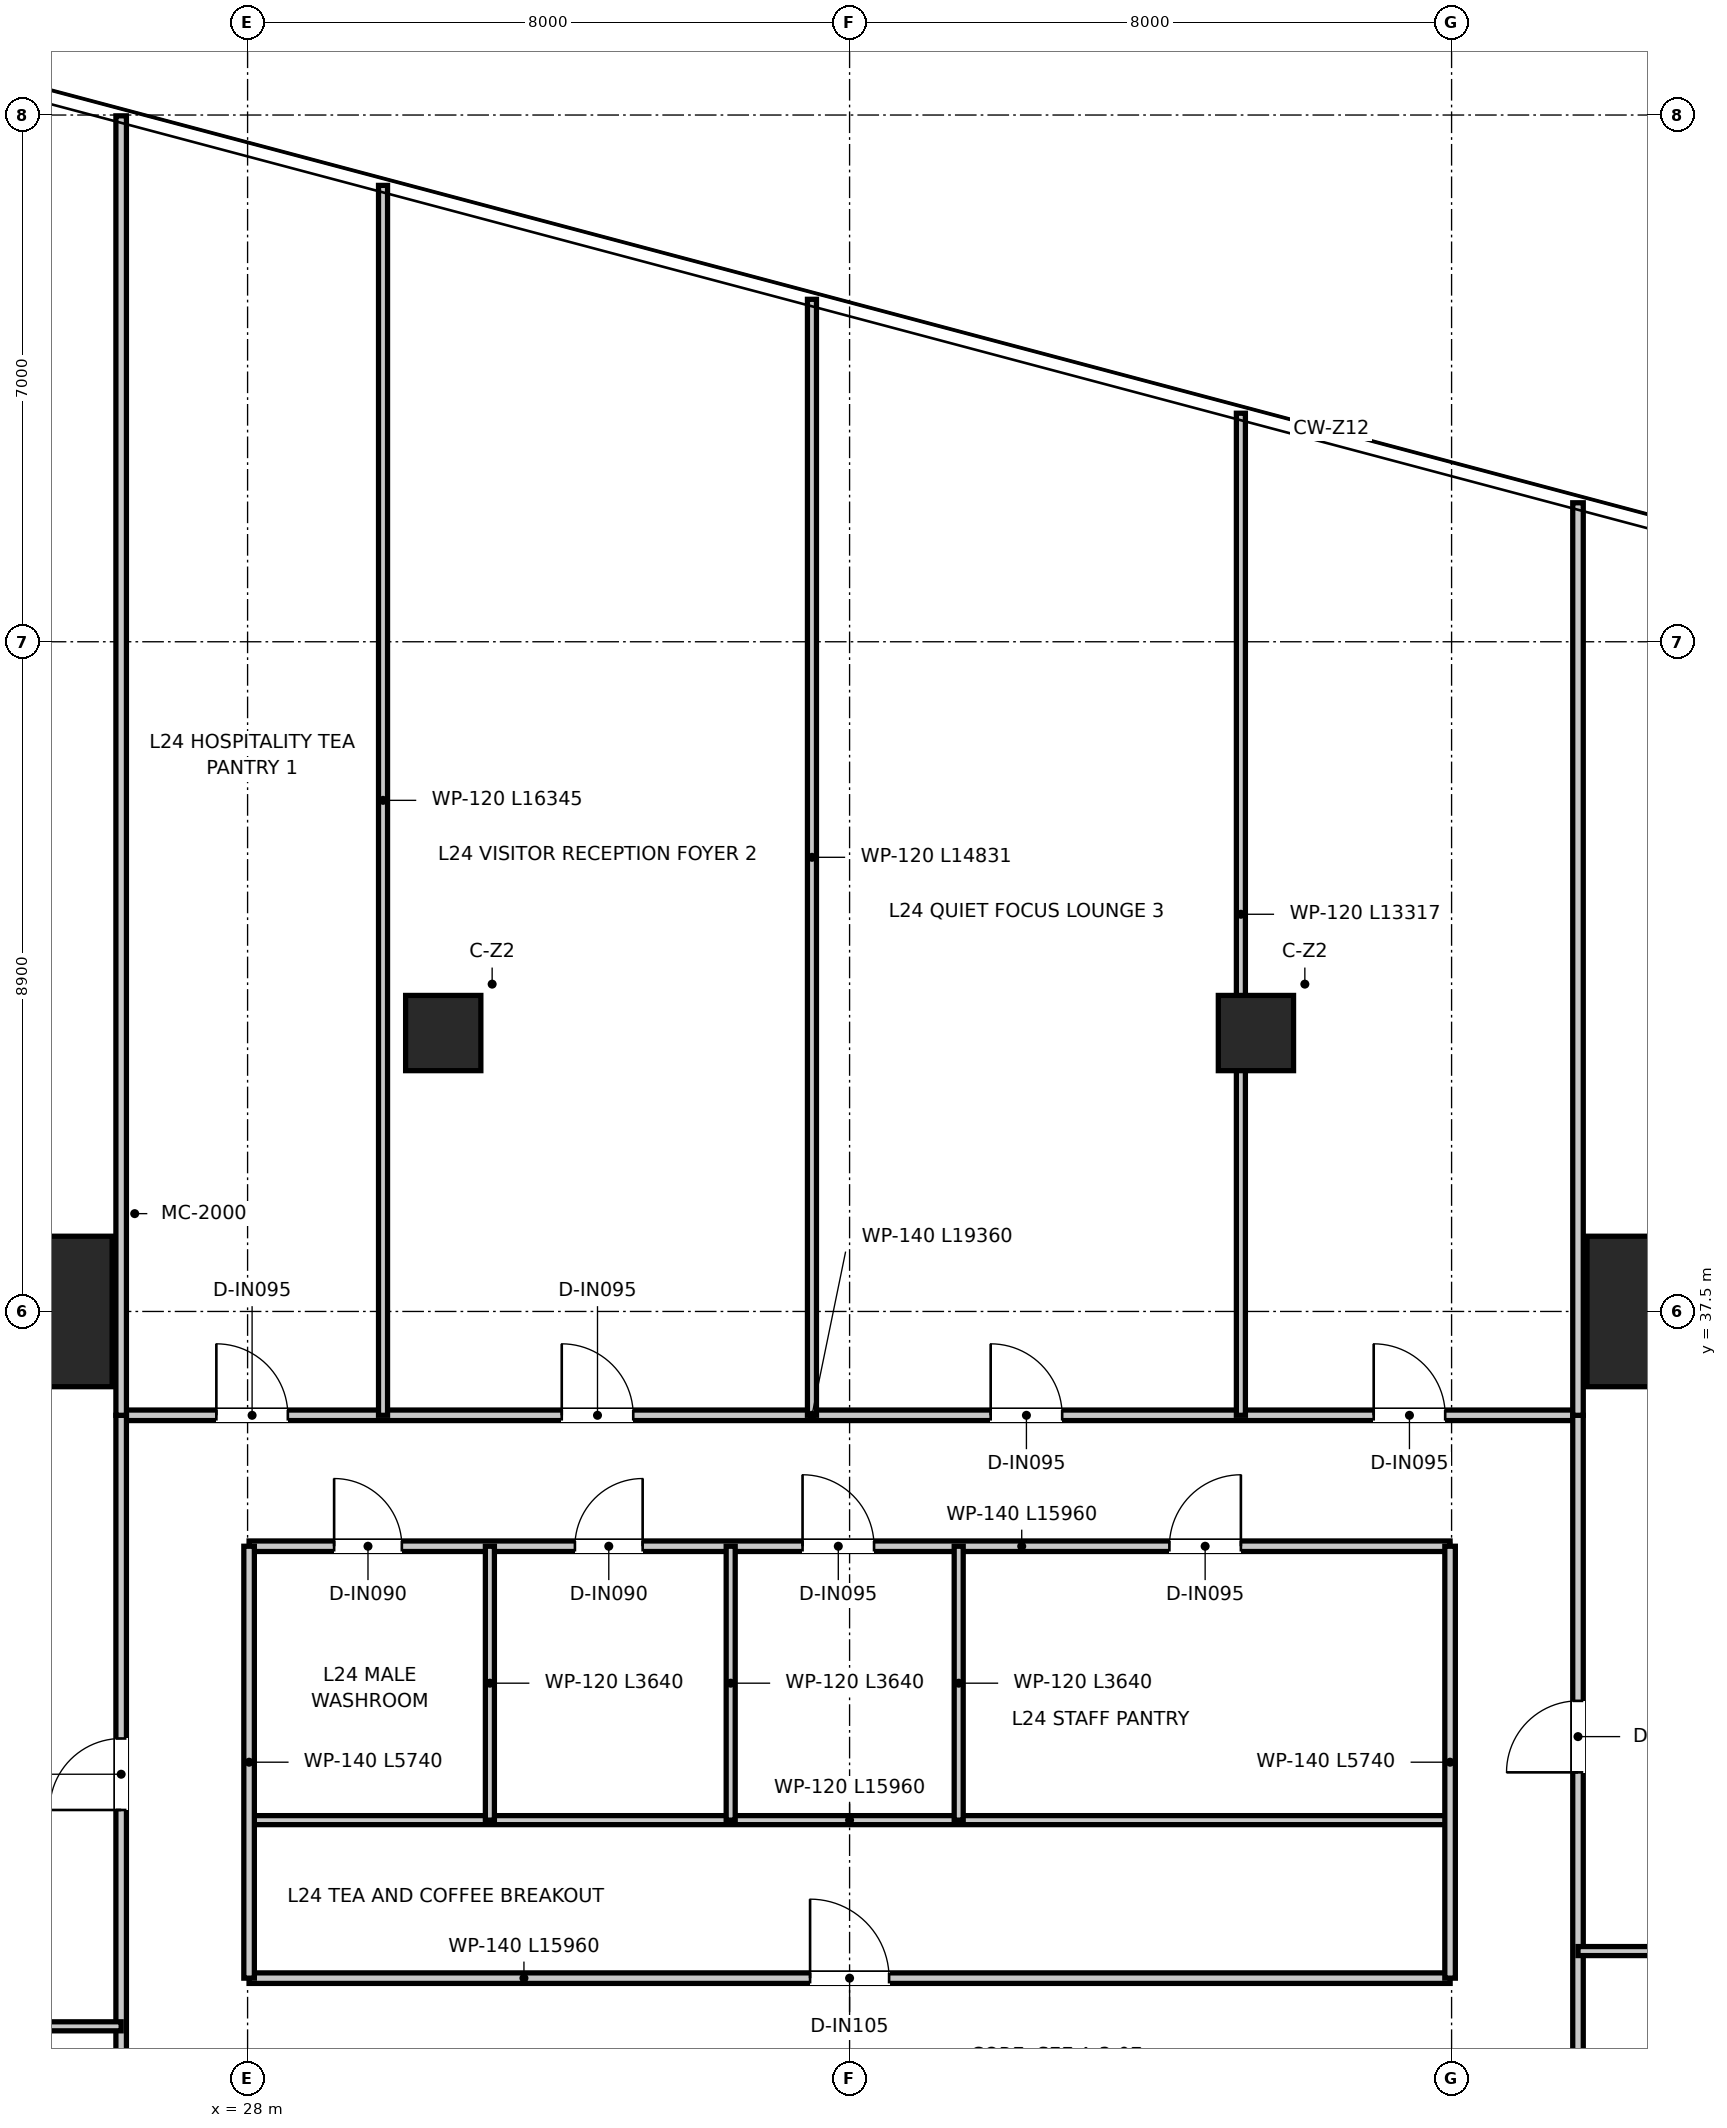
"""IFC4 building model, lengths in metres.
Left out: names, types, materials, properties, quantities, classifications, styles, units other than length and angle.
Written with IfcOpenShell. Run it as: python <this file> out.ifc"""

import sys

from ifc_helpers import new_model, si_unit, direction, frame, frame_2d, origin, origin_2d, place, context, subcontext, project, spatial, rectangle, extrude, source, transform, mapped, element, fill, save


model = new_model("IFC4")
c1 = context("Model", 3, precision=1e-05, world=origin(), true_north=direction((0.0, 1.0)))
c2 = subcontext(c1, "Body", "Model", "MODEL_VIEW")
j1 = project(units=[si_unit("LENGTHUNIT", "METRE"), si_unit("PLANEANGLEUNIT", "RADIAN")], contexts=[c1])
p1 = place(None, origin())
s1 = spatial("IfcSite", under=j1, at=p1, CompositionType="ELEMENT")
p2 = place(p1, origin())
s2 = spatial("IfcBuilding", under=s1, at=p2, CompositionType="ELEMENT")
p3 = place(p2, frame((0.0, 0.0, 101.9)))
s3 = spatial("IfcBuildingStorey", under=s2, at=p3, CompositionType="ELEMENT", Elevation=101.9)
m1 = source(origin(), c2, "Body", "SweptSolid", [
    extrude(rectangle(XDim=2.0, YDim=2.0, at=origin_2d()), origin(), (0.0, 0.0, 1.0), 3.95),
])
for number, where, z_axis, x_axis in (
    (1, (46.8, 37.5, 0.0), (0.0, 0.0, 1.0), (1.0, 0.0, 0.0)),
    (2, (25.2, 37.5, 0.0), (0.0, 0.0, 1.0), (1.0, 0.0, 0.0)),
):
    element("IfcColumn", number, at=place(p3, frame(where, z_axis=z_axis, x_axis=x_axis)), inside=s3, PredefinedType="USERDEFINED", context=c2, shape_type="MappedRepresentation", body=[
        mapped(m1, transform((0.0, 0.0, 0.0), x_axis=(1.0, 0.0, 0.0), y_axis=(0.0, 1.0, 0.0), z_axis=(0.0, 0.0, 1.0), scale=1.0)),
    ])
m2 = source(origin(), c2, "Body", "SweptSolid", [
    extrude(rectangle(XDim=1.0, YDim=1.0, at=origin_2d()), origin(), (0.0, 0.0, 1.0), 3.95),
])
for number, where, z_axis, x_axis in (
    (3, (30.6, 41.2, 0.0), (0.0, 0.0, 1.0), (1.0, 0.0, 0.0)),
    (4, (41.4, 41.2, 0.0), (0.0, 0.0, 1.0), (1.0, 0.0, 0.0)),
):
    element("IfcColumn", number, at=place(p3, frame(where, z_axis=z_axis, x_axis=x_axis)), inside=s3, PredefinedType="COLUMN", context=c2, shape_type="MappedRepresentation", body=[
        mapped(m2, transform((0.0, 0.0, 0.0), x_axis=(1.0, 0.0, 0.0), y_axis=(0.0, 1.0, 0.0), z_axis=(0.0, 0.0, 1.0), scale=1.0)),
    ])
p4 = place(p3, frame((28.02, 28.64, 0.0), z_axis=(0.0, 0.0, 1.0), x_axis=(1.0, 0.0, 0.0)))
e5 = element("IfcWall", 5, at=p4, inside=s3, PredefinedType="PARTITIONING", context=c2, shape_type="SweptSolid", body=[
    extrude(rectangle(XDim=15.96, YDim=0.14, at=frame_2d((7.98, 0.0))), origin(), (0.0, 0.0, 1.0), 3.08),
])
p5 = place(p4, frame((7.455, 0.0, 0.0)))
e6 = element("IfcOpeningElement", 6, at=p5, cuts=e5, PredefinedType="OPENING", context=c2, shape_type="SweptSolid", body=[
    extrude(rectangle(XDim=1.05, YDim=2.15, at=frame_2d((0.525, 1.075))), frame((0.0, 0.08, 0.0), z_axis=(0.0, -1.0, 0.0), x_axis=(1.0, 0.0, 0.0)), (0.0, 0.0, 1.0), 0.16),
])
p6 = place(p3, frame((28.02, 30.74, 0.0), z_axis=(0.0, 0.0, 1.0), x_axis=(1.0, 0.0, 0.0)))
e7 = element("IfcWall", 7, at=p6, inside=s3, PredefinedType="PARTITIONING", context=c2, shape_type="SweptSolid", body=[
    extrude(rectangle(XDim=15.96, YDim=0.12, at=frame_2d((7.98, 0.0))), origin(), (0.0, 0.0, 1.0), 3.08),
])
p7 = place(p3, frame((28.02, 34.38, 0.0), z_axis=(0.0, 0.0, 1.0), x_axis=(1.0, 0.0, 0.0)))
e8 = element("IfcWall", 8, at=p7, inside=s3, PredefinedType="PARTITIONING", context=c2, shape_type="SweptSolid", body=[
    extrude(rectangle(XDim=15.96, YDim=0.14, at=frame_2d((7.98, 0.0))), origin(), (0.0, 0.0, 1.0), 3.08),
])
p8 = place(p7, frame((1.13, 0.0, 0.0)))
e9 = element("IfcOpeningElement", 9, at=p8, cuts=e8, PredefinedType="OPENING", context=c2, shape_type="SweptSolid", body=[
    extrude(rectangle(XDim=0.9, YDim=2.1, at=frame_2d((0.45, 1.05))), frame((0.0, 0.08, 0.0), z_axis=(0.0, -1.0, 0.0), x_axis=(1.0, 0.0, 0.0)), (0.0, 0.0, 1.0), 0.16),
])
p9 = place(p7, frame((4.33, 0.0, 0.0)))
e10 = element("IfcOpeningElement", 10, at=p9, cuts=e8, PredefinedType="OPENING", context=c2, shape_type="SweptSolid", body=[
    extrude(rectangle(XDim=0.9, YDim=2.1, at=frame_2d((0.45, 1.05))), frame((0.0, 0.08, 0.0), z_axis=(0.0, -1.0, 0.0), x_axis=(1.0, 0.0, 0.0)), (0.0, 0.0, 1.0), 0.16),
])
p10 = place(p7, frame((7.355, 0.0, 0.0)))
e11 = element("IfcOpeningElement", 11, at=p10, cuts=e8, PredefinedType="OPENING", context=c2, shape_type="SweptSolid", body=[
    extrude(rectangle(XDim=0.95, YDim=2.1, at=frame_2d((0.475, 1.05))), frame((0.0, 0.08, 0.0), z_axis=(0.0, -1.0, 0.0), x_axis=(1.0, 0.0, 0.0)), (0.0, 0.0, 1.0), 0.16),
])
p11 = place(p7, frame((12.23, 0.0, 0.0)))
e12 = element("IfcOpeningElement", 12, at=p11, cuts=e8, PredefinedType="OPENING", context=c2, shape_type="SweptSolid", body=[
    extrude(rectangle(XDim=0.95, YDim=2.1, at=frame_2d((0.475, 1.05))), frame((0.0, 0.08, 0.0), z_axis=(0.0, -1.0, 0.0), x_axis=(1.0, 0.0, 0.0)), (0.0, 0.0, 1.0), 0.16),
])
for number, where, z_axis, x_axis in (
    (13, (28.02, 28.64, 0.0), (0.0, 0.0, 1.0), (0.0, 1.0, 0.0)),
    (14, (43.98, 28.64, 0.0), (0.0, 0.0, 1.0), (0.0, 1.0, 0.0)),
):
    element("IfcWall", number, at=place(p3, frame(where, z_axis=z_axis, x_axis=x_axis)), inside=s3, PredefinedType="PARTITIONING", context=c2, shape_type="SweptSolid", body=[
        extrude(rectangle(XDim=5.74, YDim=0.14, at=frame_2d((2.87, 0.0))), origin(), (0.0, 0.0, 1.0), 3.27),
    ])
for number, where, z_axis, x_axis in (
    (15, (31.22, 30.74, 0.0), (0.0, 0.0, 1.0), (0.0, 1.0, 0.0)),
    (16, (34.42, 30.74, 0.0), (0.0, 0.0, 1.0), (0.0, 1.0, 0.0)),
    (17, (37.45, 30.74, 0.0), (0.0, 0.0, 1.0), (0.0, 1.0, 0.0)),
):
    element("IfcWall", number, at=place(p3, frame(where, z_axis=z_axis, x_axis=x_axis)), inside=s3, PredefinedType="PARTITIONING", context=c2, shape_type="SweptSolid", body=[
        extrude(rectangle(XDim=3.64, YDim=0.12, at=frame_2d((1.82, 0.0))), origin(), (0.0, 0.0, 1.0), 3.17),
    ])
p12 = place(p3, frame((26.32, 36.12, 0.0), z_axis=(0.0, 0.0, 1.0), x_axis=(1.0, 0.0, 0.0)))
e18 = element("IfcWall", 18, at=p12, inside=s3, PredefinedType="PARTITIONING", context=c2, shape_type="SweptSolid", body=[
    extrude(rectangle(XDim=19.36, YDim=0.14, at=frame_2d((9.68, 0.0))), origin(), (0.0, 0.0, 1.0), 3.08),
])
p13 = place(p12, frame((1.265, 0.0, 0.0)))
e19 = element("IfcOpeningElement", 19, at=p13, cuts=e18, PredefinedType="OPENING", context=c2, shape_type="SweptSolid", body=[
    extrude(rectangle(XDim=0.95, YDim=2.1, at=frame_2d((0.475, 1.05))), frame((0.0, 0.08, 0.0), z_axis=(0.0, -1.0, 0.0), x_axis=(1.0, 0.0, 0.0)), (0.0, 0.0, 1.0), 0.16),
])
p14 = place(p12, frame((5.855, 0.0, 0.0)))
e20 = element("IfcOpeningElement", 20, at=p14, cuts=e18, PredefinedType="OPENING", context=c2, shape_type="SweptSolid", body=[
    extrude(rectangle(XDim=0.95, YDim=2.1, at=frame_2d((0.475, 1.05))), frame((0.0, 0.08, 0.0), z_axis=(0.0, -1.0, 0.0), x_axis=(1.0, 0.0, 0.0)), (0.0, 0.0, 1.0), 0.16),
])
p15 = place(p12, frame((11.555, 0.0, 0.0)))
e21 = element("IfcOpeningElement", 21, at=p15, cuts=e18, PredefinedType="OPENING", context=c2, shape_type="SweptSolid", body=[
    extrude(rectangle(XDim=0.95, YDim=2.1, at=frame_2d((0.475, 1.05))), frame((0.0, 0.08, 0.0), z_axis=(0.0, -1.0, 0.0), x_axis=(1.0, 0.0, 0.0)), (0.0, 0.0, 1.0), 0.16),
])
p16 = place(p12, frame((16.645, 0.0, 0.0)))
e22 = element("IfcOpeningElement", 22, at=p16, cuts=e18, PredefinedType="OPENING", context=c2, shape_type="SweptSolid", body=[
    extrude(rectangle(XDim=0.95, YDim=2.1, at=frame_2d((0.475, 1.05))), frame((0.0, 0.08, 0.0), z_axis=(0.0, -1.0, 0.0), x_axis=(1.0, 0.0, 0.0)), (0.0, 0.0, 1.0), 0.16),
])
p17 = place(p3, frame((26.32, 10.5, 0.0), z_axis=(0.0, 0.0, 1.0), x_axis=(0.0, 1.0, 0.0)))
e23 = element("IfcWall", 23, at=p17, inside=s3, PredefinedType="PARTITIONING", context=c2, shape_type="SweptSolid", body=[
    extrude(rectangle(XDim=25.62, YDim=0.14, at=frame_2d((12.81, 0.0))), origin(), (0.0, 0.0, 1.0), 2.97),
])
p18 = place(p17, frame((11.775, 0.0, 0.0)))
e24 = element("IfcOpeningElement", 24, at=p18, cuts=e23, PredefinedType="OPENING", context=c2, shape_type="SweptSolid", body=[
    extrude(rectangle(XDim=0.95, YDim=2.1, at=frame_2d((0.475, 1.05))), frame((0.0, 0.08, 0.0), z_axis=(0.0, -1.0, 0.0), x_axis=(1.0, 0.0, 0.0)), (0.0, 0.0, 1.0), 0.16),
])
p19 = place(p17, frame((20.375, 0.0, 0.0)))
e25 = element("IfcOpeningElement", 25, at=p19, cuts=e23, PredefinedType="OPENING", context=c2, shape_type="SweptSolid", body=[
    extrude(rectangle(XDim=0.95, YDim=2.1, at=frame_2d((0.475, 1.05))), frame((0.0, 0.08, 0.0), z_axis=(0.0, -1.0, 0.0), x_axis=(1.0, 0.0, 0.0)), (0.0, 0.0, 1.0), 0.16),
])
p20 = place(p3, frame((45.68, 10.5, 0.0), z_axis=(0.0, 0.0, 1.0), x_axis=(0.0, 1.0, 0.0)))
e26 = element("IfcWall", 26, at=p20, inside=s3, PredefinedType="PARTITIONING", context=c2, shape_type="SweptSolid", body=[
    extrude(rectangle(XDim=25.62, YDim=0.14, at=frame_2d((12.81, 0.0))), origin(), (0.0, 0.0, 1.0), 2.97),
])
p21 = place(p20, frame((8.275, 0.0, 0.0)))
e27 = element("IfcOpeningElement", 27, at=p21, cuts=e26, PredefinedType="OPENING", context=c2, shape_type="SweptSolid", body=[
    extrude(rectangle(XDim=0.95, YDim=2.1, at=frame_2d((0.475, 1.05))), frame((0.0, 0.08, 0.0), z_axis=(0.0, -1.0, 0.0), x_axis=(1.0, 0.0, 0.0)), (0.0, 0.0, 1.0), 0.16),
])
p22 = place(p20, frame((14.025, 0.0, 0.0)))
e28 = element("IfcOpeningElement", 28, at=p22, cuts=e26, PredefinedType="OPENING", context=c2, shape_type="SweptSolid", body=[
    extrude(rectangle(XDim=0.95, YDim=2.1, at=frame_2d((0.475, 1.05))), frame((0.0, 0.08, 0.0), z_axis=(0.0, -1.0, 0.0), x_axis=(1.0, 0.0, 0.0)), (0.0, 0.0, 1.0), 0.16),
])
p23 = place(p20, frame((20.875, 0.0, 0.0)))
e29 = element("IfcOpeningElement", 29, at=p23, cuts=e26, PredefinedType="OPENING", context=c2, shape_type="SweptSolid", body=[
    extrude(rectangle(XDim=0.95, YDim=2.1, at=frame_2d((0.475, 1.05))), frame((0.0, 0.08, 0.0), z_axis=(0.0, -1.0, 0.0), x_axis=(1.0, 0.0, 0.0)), (0.0, 0.0, 1.0), 0.16),
])
p24 = place(p3, frame((26.32, 36.12, 0.0), z_axis=(0.0, 0.0, 1.0), x_axis=(0.0, 1.0, 0.0)))
e30 = element("IfcWall", 30, at=p24, inside=s3, PredefinedType="PARTITIONING", context=c2, shape_type="SweptSolid", body=[
    extrude(rectangle(XDim=17.269, YDim=0.14, at=frame_2d((8.635, 0.0))), origin(), (0.0, 0.0, 1.0), 2.97),
])
p25 = place(p3, frame((45.68, 36.12, 0.0), z_axis=(0.0, 0.0, 1.0), x_axis=(0.0, 1.0, 0.0)))
e31 = element("IfcWall", 31, at=p25, inside=s3, PredefinedType="PARTITIONING", context=c2, shape_type="SweptSolid", body=[
    extrude(rectangle(XDim=12.127, YDim=0.14, at=frame_2d((6.063, 0.0))), origin(), (0.0, 0.0, 1.0), 2.97),
])
p26 = place(p3, frame((29.8, 36.12, 0.0), z_axis=(0.0, 0.0, 1.0), x_axis=(0.0, 1.0, 0.0)))
e32 = element("IfcWall", 32, at=p26, inside=s3, PredefinedType="PARTITIONING", context=c2, shape_type="SweptSolid", body=[
    extrude(rectangle(XDim=16.345, YDim=0.12, at=frame_2d((8.172, 0.0))), origin(), (0.0, 0.0, 1.0), 2.97),
])
p27 = place(p3, frame((35.5, 36.12, 0.0), z_axis=(0.0, 0.0, 1.0), x_axis=(0.0, 1.0, 0.0)))
e33 = element("IfcWall", 33, at=p27, inside=s3, PredefinedType="PARTITIONING", context=c2, shape_type="SweptSolid", body=[
    extrude(rectangle(XDim=14.831, YDim=0.12, at=frame_2d((7.416, 0.0))), origin(), (0.0, 0.0, 1.0), 2.97),
])
p28 = place(p3, frame((41.2, 36.12, 0.0), z_axis=(0.0, 0.0, 1.0), x_axis=(0.0, 1.0, 0.0)))
e34 = element("IfcWall", 34, at=p28, inside=s3, PredefinedType="PARTITIONING", context=c2, shape_type="SweptSolid", body=[
    extrude(rectangle(XDim=13.317, YDim=0.12, at=frame_2d((6.658, 0.0))), origin(), (0.0, 0.0, 1.0), 2.97),
])
p29 = place(p3, frame((12.227, 28.0, 0.0), z_axis=(0.0, 0.0, 1.0), x_axis=(1.0, 0.0, 0.0)))
e35 = element("IfcWall", 35, at=p29, inside=s3, PredefinedType="PARTITIONING", context=c2, shape_type="SweptSolid", body=[
    extrude(rectangle(XDim=14.093, YDim=0.12, at=frame_2d((7.046, 0.0))), origin(), (0.0, 0.0, 1.0), 2.97),
])
p30 = place(p3, frame((45.68, 29.0, 0.0), z_axis=(0.0, 0.0, 1.0), x_axis=(1.0, 0.0, 0.0)))
e36 = element("IfcWall", 36, at=p30, inside=s3, PredefinedType="PARTITIONING", context=c2, shape_type="SweptSolid", body=[
    extrude(rectangle(XDim=15.049, YDim=0.12, at=frame_2d((7.525, 0.0))), origin(), (0.0, 0.0, 1.0), 2.97),
])
p31 = place(p5, origin())
e37 = element("IfcDoor", 37, at=p31, inside=s3, OperationType="SINGLE_SWING_LEFT", PredefinedType="DOOR", context=c2, shape_type="SweptSolid", body=[
    extrude(rectangle(XDim=1.05, YDim=2.15, at=frame_2d((0.525, 1.075))), frame((0.0, 0.025, 0.0), z_axis=(0.0, -1.0, 0.0), x_axis=(1.0, 0.0, 0.0)), (0.0, 0.0, 1.0), 0.05),
])
fill(e6, e37)
p32 = place(p8, origin())
e38 = element("IfcDoor", 38, at=p32, inside=s3, OperationType="SINGLE_SWING_LEFT", PredefinedType="DOOR", context=c2, shape_type="SweptSolid", body=[
    extrude(rectangle(XDim=0.9, YDim=2.1, at=frame_2d((0.45, 1.05))), frame((0.0, 0.025, 0.0), z_axis=(0.0, -1.0, 0.0), x_axis=(1.0, 0.0, 0.0)), (0.0, 0.0, 1.0), 0.05),
])
fill(e9, e38)
p33 = place(p9, origin())
e39 = element("IfcDoor", 39, at=p33, inside=s3, OperationType="SINGLE_SWING_RIGHT", PredefinedType="DOOR", context=c2, shape_type="SweptSolid", body=[
    extrude(rectangle(XDim=0.9, YDim=2.1, at=frame_2d((0.45, 1.05))), frame((0.0, 0.025, 0.0), z_axis=(0.0, -1.0, 0.0), x_axis=(1.0, 0.0, 0.0)), (0.0, 0.0, 1.0), 0.05),
])
fill(e10, e39)
p34 = place(p10, origin())
e40 = element("IfcDoor", 40, at=p34, inside=s3, OperationType="SINGLE_SWING_LEFT", PredefinedType="DOOR", context=c2, shape_type="SweptSolid", body=[
    extrude(rectangle(XDim=0.95, YDim=2.1, at=frame_2d((0.475, 1.05))), frame((0.0, 0.025, 0.0), z_axis=(0.0, -1.0, 0.0), x_axis=(1.0, 0.0, 0.0)), (0.0, 0.0, 1.0), 0.05),
])
fill(e11, e40)
p35 = place(p11, origin())
e41 = element("IfcDoor", 41, at=p35, inside=s3, OperationType="SINGLE_SWING_RIGHT", PredefinedType="DOOR", context=c2, shape_type="SweptSolid", body=[
    extrude(rectangle(XDim=0.95, YDim=2.1, at=frame_2d((0.475, 1.05))), frame((0.0, 0.025, 0.0), z_axis=(0.0, -1.0, 0.0), x_axis=(1.0, 0.0, 0.0)), (0.0, 0.0, 1.0), 0.05),
])
fill(e12, e41)
p36 = place(p13, origin())
e42 = element("IfcDoor", 42, at=p36, inside=s3, OperationType="SINGLE_SWING_LEFT", PredefinedType="DOOR", context=c2, shape_type="SweptSolid", body=[
    extrude(rectangle(XDim=0.95, YDim=2.1, at=frame_2d((0.475, 1.05))), frame((0.0, 0.025, 0.0), z_axis=(0.0, -1.0, 0.0), x_axis=(1.0, 0.0, 0.0)), (0.0, 0.0, 1.0), 0.05),
])
fill(e19, e42)
p37 = place(p14, origin())
e43 = element("IfcDoor", 43, at=p37, inside=s3, OperationType="SINGLE_SWING_LEFT", PredefinedType="DOOR", context=c2, shape_type="SweptSolid", body=[
    extrude(rectangle(XDim=0.95, YDim=2.1, at=frame_2d((0.475, 1.05))), frame((0.0, 0.025, 0.0), z_axis=(0.0, -1.0, 0.0), x_axis=(1.0, 0.0, 0.0)), (0.0, 0.0, 1.0), 0.05),
])
fill(e20, e43)
p38 = place(p15, origin())
e44 = element("IfcDoor", 44, at=p38, inside=s3, OperationType="SINGLE_SWING_LEFT", PredefinedType="DOOR", context=c2, shape_type="SweptSolid", body=[
    extrude(rectangle(XDim=0.95, YDim=2.1, at=frame_2d((0.475, 1.05))), frame((0.0, 0.025, 0.0), z_axis=(0.0, -1.0, 0.0), x_axis=(1.0, 0.0, 0.0)), (0.0, 0.0, 1.0), 0.05),
])
fill(e21, e44)
p39 = place(p16, origin())
e45 = element("IfcDoor", 45, at=p39, inside=s3, OperationType="SINGLE_SWING_LEFT", PredefinedType="DOOR", context=c2, shape_type="SweptSolid", body=[
    extrude(rectangle(XDim=0.95, YDim=2.1, at=frame_2d((0.475, 1.05))), frame((0.0, 0.025, 0.0), z_axis=(0.0, -1.0, 0.0), x_axis=(1.0, 0.0, 0.0)), (0.0, 0.0, 1.0), 0.05),
])
fill(e22, e45)
p40 = place(p19, origin())
e46 = element("IfcDoor", 46, at=p40, inside=s3, OperationType="SINGLE_SWING_LEFT", PredefinedType="DOOR", context=c2, shape_type="SweptSolid", body=[
    extrude(rectangle(XDim=0.95, YDim=2.1, at=frame_2d((0.475, 1.05))), frame((0.0, 0.025, 0.0), z_axis=(0.0, -1.0, 0.0), x_axis=(1.0, 0.0, 0.0)), (0.0, 0.0, 1.0), 0.05),
])
fill(e25, e46)
p41 = place(p23, origin())
e47 = element("IfcDoor", 47, at=p41, inside=s3, OperationType="SINGLE_SWING_LEFT", PredefinedType="DOOR", context=c2, shape_type="SweptSolid", body=[
    extrude(rectangle(XDim=0.95, YDim=2.1, at=frame_2d((0.475, 1.05))), frame((0.0, 0.025, 0.0), z_axis=(0.0, -1.0, 0.0), x_axis=(1.0, 0.0, 0.0)), (0.0, 0.0, 1.0), 0.05),
])
fill(e29, e47)
save(model, sys.argv[1])
